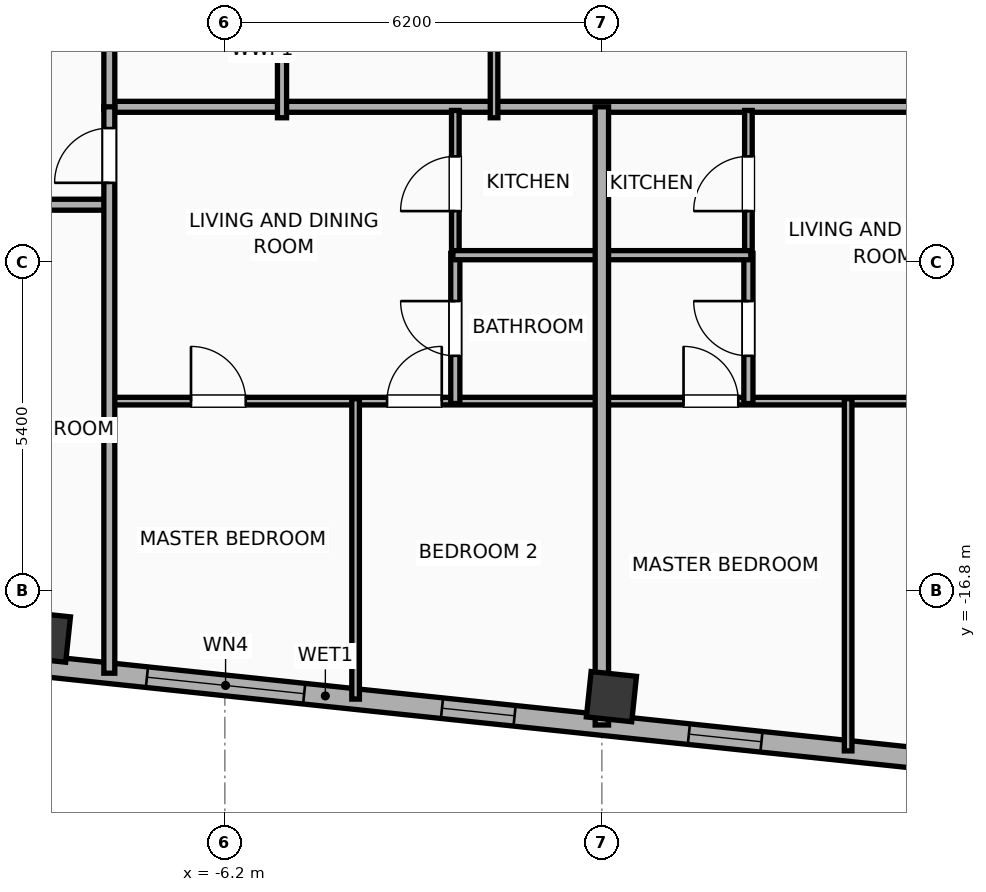
"""IFC4 building model, lengths in metres.
Left out: names, types, materials, properties, quantities, classifications, styles, units other than length and angle.
Written with IfcOpenShell. Run it as: python <this file> out.ifc"""

import sys

from ifc_helpers import new_model, si_unit, direction, frame, frame_2d, origin, origin_2d, place, context, subcontext, project, spatial, rectangle, hollow_rectangle, extrude, element, fill, save


model = new_model("IFC4")
c1 = context("Model", 3, precision=1e-05, world=origin(), true_north=direction((0.0, 1.0)))
c2 = subcontext(c1, "Body", "Model", "MODEL_VIEW")
j1 = project(units=[si_unit("LENGTHUNIT", "METRE"), si_unit("PLANEANGLEUNIT", "RADIAN")], contexts=[c1])
p1 = place(None, origin())
s1 = spatial("IfcSite", under=j1, at=p1, CompositionType="ELEMENT")
p2 = place(p1, origin())
s2 = spatial("IfcBuilding", under=s1, at=p2, CompositionType="ELEMENT")
p3 = place(p2, frame((0.0, 0.0, 302.9)))
s3 = spatial("IfcBuildingStorey", under=s2, at=p3, CompositionType="ELEMENT", Elevation=302.9)
for number, where, z_axis, x_axis in (
    (1, (-9.152, -17.561, 0.0), (0.0, 0.0, 1.0), (0.995, -0.105, 0.0)),
    (2, (0.157, -18.54, 0.0), (0.0, 0.0, 1.0), (0.995, -0.105, 0.0)),
):
    element("IfcColumn", number, at=place(p3, frame(where, z_axis=z_axis, x_axis=x_axis)), inside=s3, PredefinedType="COLUMN", context=c2, shape_type="SweptSolid", body=[
        extrude(hollow_rectangle(XDim=0.75, YDim=0.75, WallThickness=0.025, at=origin_2d()), origin(), (0.0, 0.0, 1.0), 3.9),
    ])
p4 = place(p3, frame((18.708, -20.972, 0.0), z_axis=(0.0, 0.0, 1.0), x_axis=(-0.994521888554, 0.104528528102, 0.0)))
e3 = element("IfcWall", 3, at=p4, inside=s3, PredefinedType="ELEMENTEDWALL", context=c2, shape_type="SweptSolid", body=[
    extrude(rectangle(XDim=46.766, YDim=0.34, at=frame_2d((23.383, 0.0))), origin(), (0.0, 0.0, 1.0), 3.635),
])
p5 = place(p4, frame((23.733, 0.0, 0.65)))
e4 = element("IfcOpeningElement", 4, at=p5, cuts=e3, PredefinedType="OPENING", context=c2, shape_type="SweptSolid", body=[
    extrude(rectangle(XDim=2.6, YDim=2.45, at=frame_2d((1.3, 1.225))), frame((0.0, 0.18, 0.0), z_axis=(0.0, -1.0, 0.0), x_axis=(1.0, 0.0, 0.0)), (0.0, 0.0, 1.0), 0.36),
])
p6 = place(p4, frame((44.402, 0.0, 0.75)))
e5 = element("IfcOpeningElement", 5, at=p6, cuts=e3, PredefinedType="OPENING", context=c2, shape_type="SweptSolid", body=[
    extrude(rectangle(XDim=1.2, YDim=2.05, at=frame_2d((0.6, 1.025))), frame((0.0, 0.18, 0.0), z_axis=(0.0, -1.0, 0.0), x_axis=(1.0, 0.0, 0.0)), (0.0, 0.0, 1.0), 0.36),
])
p7 = place(p4, frame((39.54, 0.0, 0.75)))
e6 = element("IfcOpeningElement", 6, at=p7, cuts=e3, PredefinedType="OPENING", context=c2, shape_type="SweptSolid", body=[
    extrude(rectangle(XDim=1.2, YDim=2.05, at=frame_2d((0.6, 1.025))), frame((0.0, 0.18, 0.0), z_axis=(0.0, -1.0, 0.0), x_axis=(1.0, 0.0, 0.0)), (0.0, 0.0, 1.0), 0.36),
])
p8 = place(p4, frame((42.406, 0.0, 0.75)))
e7 = element("IfcOpeningElement", 7, at=p8, cuts=e3, PredefinedType="OPENING", context=c2, shape_type="SweptSolid", body=[
    extrude(rectangle(XDim=1.2, YDim=2.05, at=frame_2d((0.6, 1.025))), frame((0.0, 0.18, 0.0), z_axis=(0.0, -1.0, 0.0), x_axis=(1.0, 0.0, 0.0)), (0.0, 0.0, 1.0), 0.36),
])
p9 = place(p4, frame((34.933, 0.0, 0.75)))
e8 = element("IfcOpeningElement", 8, at=p9, cuts=e3, PredefinedType="OPENING", context=c2, shape_type="SweptSolid", body=[
    extrude(rectangle(XDim=1.2, YDim=2.05, at=frame_2d((0.6, 1.025))), frame((0.0, 0.18, 0.0), z_axis=(0.0, -1.0, 0.0), x_axis=(1.0, 0.0, 0.0)), (0.0, 0.0, 1.0), 0.36),
])
p10 = place(p4, frame((28.631, 0.0, 0.75)))
e9 = element("IfcOpeningElement", 9, at=p10, cuts=e3, PredefinedType="OPENING", context=c2, shape_type="SweptSolid", body=[
    extrude(rectangle(XDim=1.2, YDim=2.05, at=frame_2d((0.6, 1.025))), frame((0.0, 0.18, 0.0), z_axis=(0.0, -1.0, 0.0), x_axis=(1.0, 0.0, 0.0)), (0.0, 0.0, 1.0), 0.36),
])
p11 = place(p4, frame((30.896, 0.0, 0.75)))
e10 = element("IfcOpeningElement", 10, at=p11, cuts=e3, PredefinedType="OPENING", context=c2, shape_type="SweptSolid", body=[
    extrude(rectangle(XDim=1.2, YDim=2.05, at=frame_2d((0.6, 1.025))), frame((0.0, 0.18, 0.0), z_axis=(0.0, -1.0, 0.0), x_axis=(1.0, 0.0, 0.0)), (0.0, 0.0, 1.0), 0.36),
])
p12 = place(p4, frame((7.501, 0.0, 0.75)))
e11 = element("IfcOpeningElement", 11, at=p12, cuts=e3, PredefinedType="OPENING", context=c2, shape_type="SweptSolid", body=[
    extrude(rectangle(XDim=1.2, YDim=2.05, at=frame_2d((0.6, 1.025))), frame((0.0, 0.18, 0.0), z_axis=(0.0, -1.0, 0.0), x_axis=(1.0, 0.0, 0.0)), (0.0, 0.0, 1.0), 0.36),
])
p13 = place(p4, frame((4.159, 0.0, 0.75)))
e12 = element("IfcOpeningElement", 12, at=p13, cuts=e3, PredefinedType="OPENING", context=c2, shape_type="SweptSolid", body=[
    extrude(rectangle(XDim=1.2, YDim=2.05, at=frame_2d((0.6, 1.025))), frame((0.0, 0.18, 0.0), z_axis=(0.0, -1.0, 0.0), x_axis=(1.0, 0.0, 0.0)), (0.0, 0.0, 1.0), 0.36),
])
p14 = place(p4, frame((1.369, 0.0, 0.75)))
e13 = element("IfcOpeningElement", 13, at=p14, cuts=e3, PredefinedType="OPENING", context=c2, shape_type="SweptSolid", body=[
    extrude(rectangle(XDim=1.2, YDim=2.05, at=frame_2d((0.6, 1.025))), frame((0.0, 0.18, 0.0), z_axis=(0.0, -1.0, 0.0), x_axis=(1.0, 0.0, 0.0)), (0.0, 0.0, 1.0), 0.36),
])
p15 = place(p4, frame((20.254, 0.0, 0.75)))
e14 = element("IfcOpeningElement", 14, at=p15, cuts=e3, PredefinedType="OPENING", context=c2, shape_type="SweptSolid", body=[
    extrude(rectangle(XDim=1.2, YDim=2.05, at=frame_2d((0.6, 1.025))), frame((0.0, 0.18, 0.0), z_axis=(0.0, -1.0, 0.0), x_axis=(1.0, 0.0, 0.0)), (0.0, 0.0, 1.0), 0.36),
])
p16 = place(p4, frame((16.172, 0.0, 0.75)))
e15 = element("IfcOpeningElement", 15, at=p16, cuts=e3, PredefinedType="OPENING", context=c2, shape_type="SweptSolid", body=[
    extrude(rectangle(XDim=1.2, YDim=2.05, at=frame_2d((0.6, 1.025))), frame((0.0, 0.18, 0.0), z_axis=(0.0, -1.0, 0.0), x_axis=(1.0, 0.0, 0.0)), (0.0, 0.0, 1.0), 0.36),
])
p17 = place(p4, frame((12.11, 0.0, 0.75)))
e16 = element("IfcOpeningElement", 16, at=p17, cuts=e3, PredefinedType="OPENING", context=c2, shape_type="SweptSolid", body=[
    extrude(rectangle(XDim=1.2, YDim=2.05, at=frame_2d((0.6, 1.025))), frame((0.0, 0.18, 0.0), z_axis=(0.0, -1.0, 0.0), x_axis=(1.0, 0.0, 0.0)), (0.0, 0.0, 1.0), 0.36),
])
p18 = place(p3, frame((-8.15, -8.84, 0.0), z_axis=(0.0, 0.0, 1.0), x_axis=(1.0, 0.0, 0.0)))
e17 = element("IfcWall", 17, at=p18, inside=s3, PredefinedType="PARTITIONING", context=c2, shape_type="SweptSolid", body=[
    extrude(rectangle(XDim=16.3, YDim=0.18, at=frame_2d((8.15, 0.0))), origin(), (0.0, 0.0, 1.0), 3.635),
])
p19 = place(p3, frame((-8.1, -8.88, 0.0), z_axis=(0.0, 0.0, 1.0), x_axis=(0.0, 1.0, 0.0)))
e18 = element("IfcWall", 18, at=p19, inside=s3, PredefinedType="PARTITIONING", context=c2, shape_type="SweptSolid", body=[
    extrude(rectangle(XDim=17.76, YDim=0.18, at=frame_2d((8.88, 0.0))), origin(), (0.0, 0.0, 1.0), 3.635),
])
p20 = place(p19, frame((1.276, 0.0, 0.0)))
e19 = element("IfcOpeningElement", 19, at=p20, cuts=e18, PredefinedType="OPENING", context=c2, shape_type="SweptSolid", body=[
    extrude(rectangle(XDim=1.0, YDim=2.05, at=frame_2d((0.5, 1.025))), frame((0.0, 0.1, 0.0), z_axis=(0.0, -1.0, 0.0), x_axis=(1.0, 0.0, 0.0)), (0.0, 0.0, 1.0), 0.2),
])
p21 = place(p19, frame((10.181, 0.0, 0.0)))
e20 = element("IfcOpeningElement", 20, at=p21, cuts=e18, PredefinedType="OPENING", context=c2, shape_type="SweptSolid", body=[
    extrude(rectangle(XDim=0.95, YDim=2.05, at=frame_2d((0.475, 1.025))), frame((0.0, 0.1, 0.0), z_axis=(0.0, -1.0, 0.0), x_axis=(1.0, 0.0, 0.0)), (0.0, 0.0, 1.0), 0.2),
])
p22 = place(p3, frame((-5.26, -9.02, 0.0), z_axis=(0.0, 0.0, 1.0), x_axis=(0.0, 1.0, 0.0)))
e21 = element("IfcWall", 21, at=p22, inside=s3, PredefinedType="PLUMBINGWALL", context=c2, shape_type="SweptSolid", body=[
    extrude(rectangle(XDim=3.35, YDim=0.15, at=frame_2d((1.675, 0.0))), origin(), (0.0, 0.0, 1.0), 3.635),
])
p23 = place(p3, frame((-1.773, -9.02, 0.0), z_axis=(0.0, 0.0, 1.0), x_axis=(0.0, 1.0, 0.0)))
e22 = element("IfcWall", 22, at=p23, inside=s3, PredefinedType="PARTITIONING", context=c2, shape_type="SweptSolid", body=[
    extrude(rectangle(XDim=17.99, YDim=0.125, at=frame_2d((8.995, 0.0))), origin(), (0.0, 0.0, 1.0), 3.635),
])
p24 = place(p23, frame((8.52, 0.0, 0.0)))
e23 = element("IfcOpeningElement", 23, at=p24, cuts=e22, PredefinedType="OPENING", context=c2, shape_type="SweptSolid", body=[
    extrude(rectangle(XDim=0.95, YDim=2.05, at=frame_2d((0.475, 1.025))), frame((0.0, 0.073, 0.0), z_axis=(0.0, -1.0, 0.0), x_axis=(1.0, 0.0, 0.0)), (0.0, 0.0, 1.0), 0.145),
])
p25 = place(p3, frame((-30.676, -10.45, 0.0), z_axis=(0.0, 0.0, 1.0), x_axis=(1.0, 0.0, 0.0)))
e24 = element("IfcWall", 24, at=p25, inside=s3, PredefinedType="PARTITIONING", context=c2, shape_type="SweptSolid", body=[
    extrude(rectangle(XDim=22.596, YDim=0.18, at=frame_2d((11.298, 0.0))), origin(), (0.0, 0.0, 1.0), 3.635),
])
p26 = place(p25, frame((2.336, 0.0, 0.0)))
e25 = element("IfcOpeningElement", 25, at=p26, cuts=e24, PredefinedType="OPENING", context=c2, shape_type="SweptSolid", body=[
    extrude(rectangle(XDim=0.9, YDim=2.05, at=frame_2d((0.45, 1.025))), frame((0.0, 0.1, 0.0), z_axis=(0.0, -1.0, 0.0), x_axis=(1.0, 0.0, 0.0)), (0.0, 0.0, 1.0), 0.2),
])
p27 = place(p25, frame((8.861, 0.0, 0.0)))
e26 = element("IfcOpeningElement", 26, at=p27, cuts=e24, PredefinedType="OPENING", context=c2, shape_type="SweptSolid", body=[
    extrude(rectangle(XDim=1.15, YDim=2.05, at=frame_2d((0.575, 1.025))), frame((0.0, 0.1, 0.0), z_axis=(0.0, -1.0, 0.0), x_axis=(1.0, 0.0, 0.0)), (0.0, 0.0, 1.0), 0.2),
])
p28 = place(p25, frame((13.774, 0.0, 0.0)))
e27 = element("IfcOpeningElement", 27, at=p28, cuts=e24, PredefinedType="OPENING", context=c2, shape_type="SweptSolid", body=[
    extrude(rectangle(XDim=0.9, YDim=2.05, at=frame_2d((0.45, 1.025))), frame((0.0, 0.1, 0.0), z_axis=(0.0, -1.0, 0.0), x_axis=(1.0, 0.0, 0.0)), (0.0, 0.0, 1.0), 0.2),
])
p29 = place(p25, frame((20.306, 0.0, 0.0)))
e28 = element("IfcOpeningElement", 28, at=p29, cuts=e24, PredefinedType="OPENING", context=c2, shape_type="SweptSolid", body=[
    extrude(rectangle(XDim=1.15, YDim=2.05, at=frame_2d((0.575, 1.025))), frame((0.0, 0.1, 0.0), z_axis=(0.0, -1.0, 0.0), x_axis=(1.0, 0.0, 0.0)), (0.0, 0.0, 1.0), 0.2),
])
p30 = place(p3, frame((-8.08, -13.68, 0.0), z_axis=(0.0, 0.0, 1.0), x_axis=(1.0, 0.0, 0.0)))
e29 = element("IfcWall", 29, at=p30, inside=s3, PredefinedType="PARTITIONING", context=c2, shape_type="SweptSolid", body=[
    extrude(rectangle(XDim=8.06, YDim=0.125, at=frame_2d((4.03, 0.0))), origin(), (0.0, 0.0, 1.0), 3.635),
])
p31 = place(p30, frame((1.323, 0.0, 0.0)))
e30 = element("IfcOpeningElement", 30, at=p31, cuts=e29, PredefinedType="OPENING", context=c2, shape_type="SweptSolid", body=[
    extrude(rectangle(XDim=0.9, YDim=2.05, at=frame_2d((0.45, 1.025))), frame((0.0, 0.073, 0.0), z_axis=(0.0, -1.0, 0.0), x_axis=(1.0, 0.0, 0.0)), (0.0, 0.0, 1.0), 0.145),
])
p32 = place(p30, frame((4.547, 0.0, 0.0)))
e31 = element("IfcOpeningElement", 31, at=p32, cuts=e29, PredefinedType="OPENING", context=c2, shape_type="SweptSolid", body=[
    extrude(rectangle(XDim=0.9, YDim=2.05, at=frame_2d((0.45, 1.025))), frame((0.0, 0.073, 0.0), z_axis=(0.0, -1.0, 0.0), x_axis=(1.0, 0.0, 0.0)), (0.0, 0.0, 1.0), 0.145),
])
p33 = place(p3, frame((-2.41, -11.31, 0.0), z_axis=(0.0, 0.0, 1.0), x_axis=(0.0, 1.0, 0.0)))
e32 = element("IfcWall", 32, at=p33, inside=s3, PredefinedType="PARTITIONING", context=c2, shape_type="SweptSolid", body=[
    extrude(rectangle(XDim=2.41, YDim=0.125, at=frame_2d((1.205, 0.0))), origin(), (0.0, 0.0, 1.0), 3.635),
])
p34 = place(p33, frame((0.755, 0.0, 0.0)))
e33 = element("IfcOpeningElement", 33, at=p34, cuts=e32, PredefinedType="OPENING", context=c2, shape_type="SweptSolid", body=[
    extrude(rectangle(XDim=0.9, YDim=2.05, at=frame_2d((0.45, 1.025))), frame((0.0, 0.073, 0.0), z_axis=(0.0, -1.0, 0.0), x_axis=(1.0, 0.0, 0.0)), (0.0, 0.0, 1.0), 0.145),
])
p35 = place(p3, frame((-2.41, -13.72, 0.0), z_axis=(0.0, 0.0, 1.0), x_axis=(0.0, 1.0, 0.0)))
e34 = element("IfcWall", 34, at=p35, inside=s3, PredefinedType="PLUMBINGWALL", context=c2, shape_type="SweptSolid", body=[
    extrude(rectangle(XDim=2.47, YDim=0.15, at=frame_2d((1.235, 0.0))), origin(), (0.0, 0.0, 1.0), 3.635),
])
p36 = place(p35, frame((0.785, 0.0, 0.0)))
e35 = element("IfcOpeningElement", 35, at=p36, cuts=e34, PredefinedType="OPENING", context=c2, shape_type="SweptSolid", body=[
    extrude(rectangle(XDim=0.9, YDim=2.05, at=frame_2d((0.45, 1.025))), frame((0.0, 0.085, 0.0), z_axis=(0.0, -1.0, 0.0), x_axis=(1.0, 0.0, 0.0)), (0.0, 0.0, 1.0), 0.17),
])
p37 = place(p3, frame((-2.45, -11.28, 0.0), z_axis=(0.0, 0.0, 1.0), x_axis=(1.0, 0.0, 0.0)))
e36 = element("IfcWall", 36, at=p37, inside=s3, PredefinedType="PLUMBINGWALL", context=c2, shape_type="SweptSolid", body=[
    extrude(rectangle(XDim=2.43, YDim=0.15, at=frame_2d((1.215, 0.0))), origin(), (0.0, 0.0, 1.0), 3.635),
])
p38 = place(p3, frame((-4.05, -18.58, 0.0), z_axis=(0.0, 0.0, 1.0), x_axis=(0.0, 1.0, 0.0)))
e37 = element("IfcWall", 37, at=p38, inside=s3, PredefinedType="PARTITIONING", context=c2, shape_type="SweptSolid", body=[
    extrude(rectangle(XDim=4.94, YDim=0.125, at=frame_2d((2.47, 0.0))), origin(), (0.0, 0.0, 1.0), 3.635),
])
p39 = place(p3, frame((-8.1, -18.155, 0.0), z_axis=(0.0, 0.0, 1.0), x_axis=(0.0, 1.0, 0.0)))
e38 = element("IfcWall", 38, at=p39, inside=s3, PredefinedType="PARTITIONING", context=c2, shape_type="SweptSolid", body=[
    extrude(rectangle(XDim=9.314, YDim=0.18, at=frame_2d((4.657, 0.0))), origin(), (0.0, 0.0, 1.0), 3.635),
])
p40 = place(p39, frame((8.064, 0.0, 0.0)))
e39 = element("IfcOpeningElement", 39, at=p40, cuts=e38, PredefinedType="OPENING", context=c2, shape_type="SweptSolid", body=[
    extrude(rectangle(XDim=0.9, YDim=2.05, at=frame_2d((0.45, 1.025))), frame((0.0, 0.1, 0.0), z_axis=(0.0, -1.0, 0.0), x_axis=(1.0, 0.0, 0.0)), (0.0, 0.0, 1.0), 0.2),
])
p41 = place(p3, frame((0.02, -13.68, 0.0), z_axis=(0.0, 0.0, 1.0), x_axis=(1.0, 0.0, 0.0)))
e40 = element("IfcWall", 40, at=p41, inside=s3, PredefinedType="PARTITIONING", context=c2, shape_type="SweptSolid", body=[
    extrude(rectangle(XDim=7.992, YDim=0.125, at=frame_2d((3.996, 0.0))), origin(), (0.0, 0.0, 1.0), 3.635),
])
p42 = place(p41, frame((1.323, 0.0, 0.0)))
e41 = element("IfcOpeningElement", 41, at=p42, cuts=e40, PredefinedType="OPENING", context=c2, shape_type="SweptSolid", body=[
    extrude(rectangle(XDim=0.9, YDim=2.05, at=frame_2d((0.45, 1.025))), frame((0.0, 0.073, 0.0), z_axis=(0.0, -1.0, 0.0), x_axis=(1.0, 0.0, 0.0)), (0.0, 0.0, 1.0), 0.145),
])
p43 = place(p41, frame((5.837, 0.0, 0.0)))
e42 = element("IfcOpeningElement", 42, at=p43, cuts=e40, PredefinedType="OPENING", context=c2, shape_type="SweptSolid", body=[
    extrude(rectangle(XDim=0.9, YDim=2.05, at=frame_2d((0.45, 1.025))), frame((0.0, 0.073, 0.0), z_axis=(0.0, -1.0, 0.0), x_axis=(1.0, 0.0, 0.0)), (0.0, 0.0, 1.0), 0.145),
])
p44 = place(p3, frame((2.41, -11.31, 0.0), z_axis=(0.0, 0.0, 1.0), x_axis=(0.0, 1.0, 0.0)))
e43 = element("IfcWall", 43, at=p44, inside=s3, PredefinedType="PARTITIONING", context=c2, shape_type="SweptSolid", body=[
    extrude(rectangle(XDim=2.41, YDim=0.125, at=frame_2d((1.205, 0.0))), origin(), (0.0, 0.0, 1.0), 3.635),
])
p45 = place(p44, frame((0.755, 0.0, 0.0)))
e44 = element("IfcOpeningElement", 44, at=p45, cuts=e43, PredefinedType="OPENING", context=c2, shape_type="SweptSolid", body=[
    extrude(rectangle(XDim=0.9, YDim=2.05, at=frame_2d((0.45, 1.025))), frame((0.0, 0.073, 0.0), z_axis=(0.0, -1.0, 0.0), x_axis=(1.0, 0.0, 0.0)), (0.0, 0.0, 1.0), 0.145),
])
p46 = place(p3, frame((2.41, -13.72, 0.0), z_axis=(0.0, 0.0, 1.0), x_axis=(0.0, 1.0, 0.0)))
e45 = element("IfcWall", 45, at=p46, inside=s3, PredefinedType="PLUMBINGWALL", context=c2, shape_type="SweptSolid", body=[
    extrude(rectangle(XDim=2.47, YDim=0.15, at=frame_2d((1.235, 0.0))), origin(), (0.0, 0.0, 1.0), 3.075),
])
p47 = place(p46, frame((0.785, 0.0, 0.0)))
e46 = element("IfcOpeningElement", 46, at=p47, cuts=e45, PredefinedType="OPENING", context=c2, shape_type="SweptSolid", body=[
    extrude(rectangle(XDim=0.9, YDim=2.05, at=frame_2d((0.45, 1.025))), frame((0.0, 0.085, 0.0), z_axis=(0.0, -1.0, 0.0), x_axis=(1.0, 0.0, 0.0)), (0.0, 0.0, 1.0), 0.17),
])
p48 = place(p3, frame((0.02, -11.28, 0.0), z_axis=(0.0, 0.0, 1.0), x_axis=(1.0, 0.0, 0.0)))
e47 = element("IfcWall", 47, at=p48, inside=s3, PredefinedType="PLUMBINGWALL", context=c2, shape_type="SweptSolid", body=[
    extrude(rectangle(XDim=2.43, YDim=0.15, at=frame_2d((1.215, 0.0))), origin(), (0.0, 0.0, 1.0), 3.635),
])
p49 = place(p3, frame((4.05, -19.432, 0.0), z_axis=(0.0, 0.0, 1.0), x_axis=(0.0, 1.0, 0.0)))
e48 = element("IfcWall", 48, at=p49, inside=s3, PredefinedType="PARTITIONING", context=c2, shape_type="SweptSolid", body=[
    extrude(rectangle(XDim=5.792, YDim=0.125, at=frame_2d((2.896, 0.0))), origin(), (0.0, 0.0, 1.0), 3.635),
])
p50 = place(p3, frame((0.0, -19.006, 0.0), z_axis=(0.0, 0.0, 1.0), x_axis=(0.0, 1.0, 0.0)))
e49 = element("IfcWall", 49, at=p50, inside=s3, PredefinedType="PARTITIONING", context=c2, shape_type="SweptSolid", body=[
    extrude(rectangle(XDim=10.166, YDim=0.22, at=frame_2d((5.083, 0.0))), origin(), (0.0, 0.0, 1.0), 3.635),
])
p51 = place(p5, origin())
e50 = element("IfcWindow", 50, at=p51, inside=s3, PartitioningType="SINGLE_PANEL", PredefinedType="WINDOW", context=c2, shape_type="SweptSolid", body=[
    extrude(rectangle(XDim=2.6, YDim=2.45, at=frame_2d((1.3, 1.225))), frame((0.0, 0.03, 0.0), z_axis=(0.0, -1.0, 0.0), x_axis=(1.0, 0.0, 0.0)), (0.0, 0.0, 1.0), 0.06),
])
fill(e4, e50)
p52 = place(p15, origin())
e51 = element("IfcWindow", 51, at=p52, inside=s3, PartitioningType="SINGLE_PANEL", PredefinedType="WINDOW", context=c2, shape_type="SweptSolid", body=[
    extrude(rectangle(XDim=1.2, YDim=2.05, at=frame_2d((0.6, 1.025))), frame((0.0, 0.03, 0.0), z_axis=(0.0, -1.0, 0.0), x_axis=(1.0, 0.0, 0.0)), (0.0, 0.0, 1.0), 0.06),
])
fill(e14, e51)
p53 = place(p16, origin())
e52 = element("IfcWindow", 52, at=p53, inside=s3, PartitioningType="SINGLE_PANEL", PredefinedType="WINDOW", context=c2, shape_type="SweptSolid", body=[
    extrude(rectangle(XDim=1.2, YDim=2.05, at=frame_2d((0.6, 1.025))), frame((0.0, 0.03, 0.0), z_axis=(0.0, -1.0, 0.0), x_axis=(1.0, 0.0, 0.0)), (0.0, 0.0, 1.0), 0.06),
])
fill(e15, e52)
p54 = place(p31, origin())
e53 = element("IfcDoor", 53, at=p54, inside=s3, OperationType="SINGLE_SWING_LEFT", PredefinedType="DOOR", context=c2, shape_type="SweptSolid", body=[
    extrude(rectangle(XDim=0.9, YDim=2.05, at=frame_2d((0.45, 1.025))), frame((0.0, 0.025, 0.0), z_axis=(0.0, -1.0, 0.0), x_axis=(1.0, 0.0, 0.0)), (0.0, 0.0, 1.0), 0.05),
])
fill(e30, e53)
p55 = place(p32, origin())
e54 = element("IfcDoor", 54, at=p55, inside=s3, OperationType="SINGLE_SWING_RIGHT", PredefinedType="DOOR", context=c2, shape_type="SweptSolid", body=[
    extrude(rectangle(XDim=0.9, YDim=2.05, at=frame_2d((0.45, 1.025))), frame((0.0, 0.025, 0.0), z_axis=(0.0, -1.0, 0.0), x_axis=(1.0, 0.0, 0.0)), (0.0, 0.0, 1.0), 0.05),
])
fill(e31, e54)
p56 = place(p34, origin())
e55 = element("IfcDoor", 55, at=p56, inside=s3, OperationType="SINGLE_SWING_LEFT", PredefinedType="DOOR", context=c2, shape_type="SweptSolid", body=[
    extrude(rectangle(XDim=0.9, YDim=2.05, at=frame_2d((0.45, 1.025))), frame((0.0, 0.025, 0.0), z_axis=(0.0, -1.0, 0.0), x_axis=(1.0, 0.0, 0.0)), (0.0, 0.0, 1.0), 0.05),
])
fill(e33, e55)
p57 = place(p36, origin())
e56 = element("IfcDoor", 56, at=p57, inside=s3, OperationType="SINGLE_SWING_RIGHT", PredefinedType="DOOR", context=c2, shape_type="SweptSolid", body=[
    extrude(rectangle(XDim=0.9, YDim=2.05, at=frame_2d((0.45, 1.025))), frame((0.0, 0.025, 0.0), z_axis=(0.0, -1.0, 0.0), x_axis=(1.0, 0.0, 0.0)), (0.0, 0.0, 1.0), 0.05),
])
fill(e35, e56)
p58 = place(p40, origin())
e57 = element("IfcDoor", 57, at=p58, inside=s3, OperationType="SINGLE_SWING_LEFT", PredefinedType="DOOR", context=c2, shape_type="SweptSolid", body=[
    extrude(rectangle(XDim=0.9, YDim=2.05, at=frame_2d((0.45, 1.025))), frame((0.0, 0.025, 0.0), z_axis=(0.0, -1.0, 0.0), x_axis=(1.0, 0.0, 0.0)), (0.0, 0.0, 1.0), 0.05),
])
fill(e39, e57)
p59 = place(p42, origin())
e58 = element("IfcDoor", 58, at=p59, inside=s3, OperationType="SINGLE_SWING_LEFT", PredefinedType="DOOR", context=c2, shape_type="SweptSolid", body=[
    extrude(rectangle(XDim=0.9, YDim=2.05, at=frame_2d((0.45, 1.025))), frame((0.0, 0.025, 0.0), z_axis=(0.0, -1.0, 0.0), x_axis=(1.0, 0.0, 0.0)), (0.0, 0.0, 1.0), 0.05),
])
fill(e41, e58)
p60 = place(p45, origin())
e59 = element("IfcDoor", 59, at=p60, inside=s3, OperationType="SINGLE_SWING_LEFT", PredefinedType="DOOR", context=c2, shape_type="SweptSolid", body=[
    extrude(rectangle(XDim=0.9, YDim=2.05, at=frame_2d((0.45, 1.025))), frame((0.0, 0.025, 0.0), z_axis=(0.0, -1.0, 0.0), x_axis=(1.0, 0.0, 0.0)), (0.0, 0.0, 1.0), 0.05),
])
fill(e44, e59)
p61 = place(p47, origin())
e60 = element("IfcDoor", 60, at=p61, inside=s3, OperationType="SINGLE_SWING_RIGHT", PredefinedType="DOOR", context=c2, shape_type="SweptSolid", body=[
    extrude(rectangle(XDim=0.9, YDim=2.05, at=frame_2d((0.45, 1.025))), frame((0.0, 0.025, 0.0), z_axis=(0.0, -1.0, 0.0), x_axis=(1.0, 0.0, 0.0)), (0.0, 0.0, 1.0), 0.05),
])
fill(e46, e60)
save(model, sys.argv[1])
